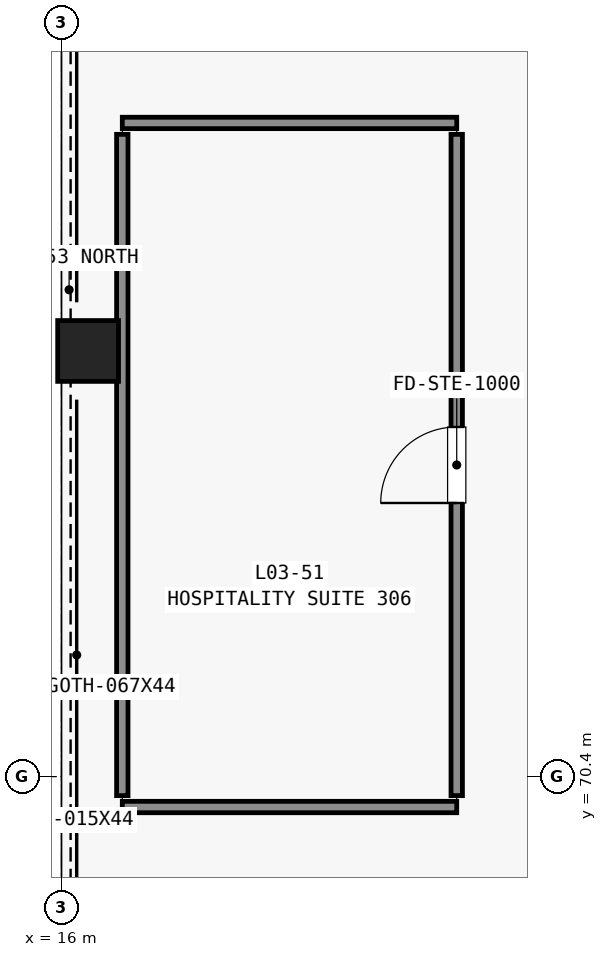
"""IFC4 building model, lengths in metres.
Left out: names, types, materials, properties, quantities, classifications, styles, units other than length and angle.
Written with IfcOpenShell. Run it as: python <this file> out.ifc"""

import sys

from ifc_helpers import new_model, si_unit, direction, frame, frame_2d, origin, origin_2d, place, context, subcontext, project, spatial, rectangle, extrude, element, fill, save


model = new_model("IFC4")
c1 = context("Model", 3, precision=1e-05, world=origin(), true_north=direction((0.0, 1.0)))
c2 = subcontext(c1, "Body", "Model", "MODEL_VIEW")
j1 = project(units=[si_unit("LENGTHUNIT", "METRE"), si_unit("PLANEANGLEUNIT", "RADIAN")], contexts=[c1])
p1 = place(None, origin())
s1 = spatial("IfcSite", under=j1, at=p1, CompositionType="ELEMENT")
p2 = place(p1, origin())
s2 = spatial("IfcBuilding", under=s1, at=p2, CompositionType="ELEMENT")
p3 = place(p2, frame((0.0, 0.0, 16.2)))
s3 = spatial("IfcBuildingStorey", under=s2, at=p3, CompositionType="ELEMENT", Elevation=16.2)
p4 = place(p3, frame((16.35, 76.0, 0.0), z_axis=(0.0, 0.0, 1.0), x_axis=(1.0, 0.0, 0.0)))
e1 = element("IfcColumn", 1, at=p4, inside=s3, PredefinedType="PILASTER", context=c2, shape_type="SweptSolid", body=[
    extrude(rectangle(XDim=0.8, YDim=0.8, at=origin_2d()), origin(), (0.0, 0.0, 1.0), 4.8),
])
for number, where, z_axis, x_axis in (
    (2, (16.8, 70.0, 0.0), (0.0, 0.0, 1.0), (1.0, 0.0, 0.0)),
    (3, (16.8, 79.0, 0.0), (0.0, 0.0, 1.0), (1.0, 0.0, 0.0)),
):
    element("IfcWall", number, at=place(p3, frame(where, z_axis=z_axis, x_axis=x_axis)), inside=s3, PredefinedType="STANDARD", context=c2, shape_type="SweptSolid", body=[
        extrude(rectangle(XDim=4.4, YDim=0.15, at=frame_2d((2.2, 0.0))), origin(), (0.0, 0.0, 1.0), 4.44),
    ])
p5 = place(p3, frame((16.8, 70.15, 0.0), z_axis=(0.0, 0.0, 1.0), x_axis=(0.0, 1.0, 0.0)))
e4 = element("IfcWall", 4, at=p5, inside=s3, PredefinedType="STANDARD", context=c2, shape_type="SweptSolid", body=[
    extrude(rectangle(XDim=8.7, YDim=0.15, at=frame_2d((4.35, 0.0))), origin(), (0.0, 0.0, 1.0), 4.44),
])
p6 = place(p3, frame((21.2, 70.15, 0.0), z_axis=(0.0, 0.0, 1.0), x_axis=(0.0, 1.0, 0.0)))
e5 = element("IfcWall", 5, at=p6, inside=s3, PredefinedType="STANDARD", context=c2, shape_type="SweptSolid", body=[
    extrude(rectangle(XDim=8.7, YDim=0.15, at=frame_2d((4.35, 0.0))), origin(), (0.0, 0.0, 1.0), 4.44),
])
p7 = place(p6, frame((3.85, 0.0, 0.0)))
e6 = element("IfcOpeningElement", 6, at=p7, cuts=e5, PredefinedType="OPENING", context=c2, shape_type="SweptSolid", body=[
    extrude(rectangle(XDim=1.0, YDim=2.15, at=frame_2d((0.5, 1.075))), frame((0.0, 0.085, 0.0), z_axis=(0.0, -1.0, 0.0), x_axis=(1.0, 0.0, 0.0)), (0.0, 0.0, 1.0), 0.17),
])
p8 = place(p7, origin())
e7 = element("IfcDoor", 7, at=p8, inside=s3, OperationType="SINGLE_SWING_LEFT", PredefinedType="DOOR", context=c2, shape_type="SweptSolid", body=[
    extrude(rectangle(XDim=1.0, YDim=2.15, at=frame_2d((0.5, 1.075))), frame((0.0, 0.025, 0.0), z_axis=(0.0, -1.0, 0.0), x_axis=(1.0, 0.0, 0.0)), (0.0, 0.0, 1.0), 0.05),
])
fill(e6, e7)
save(model, sys.argv[1])
